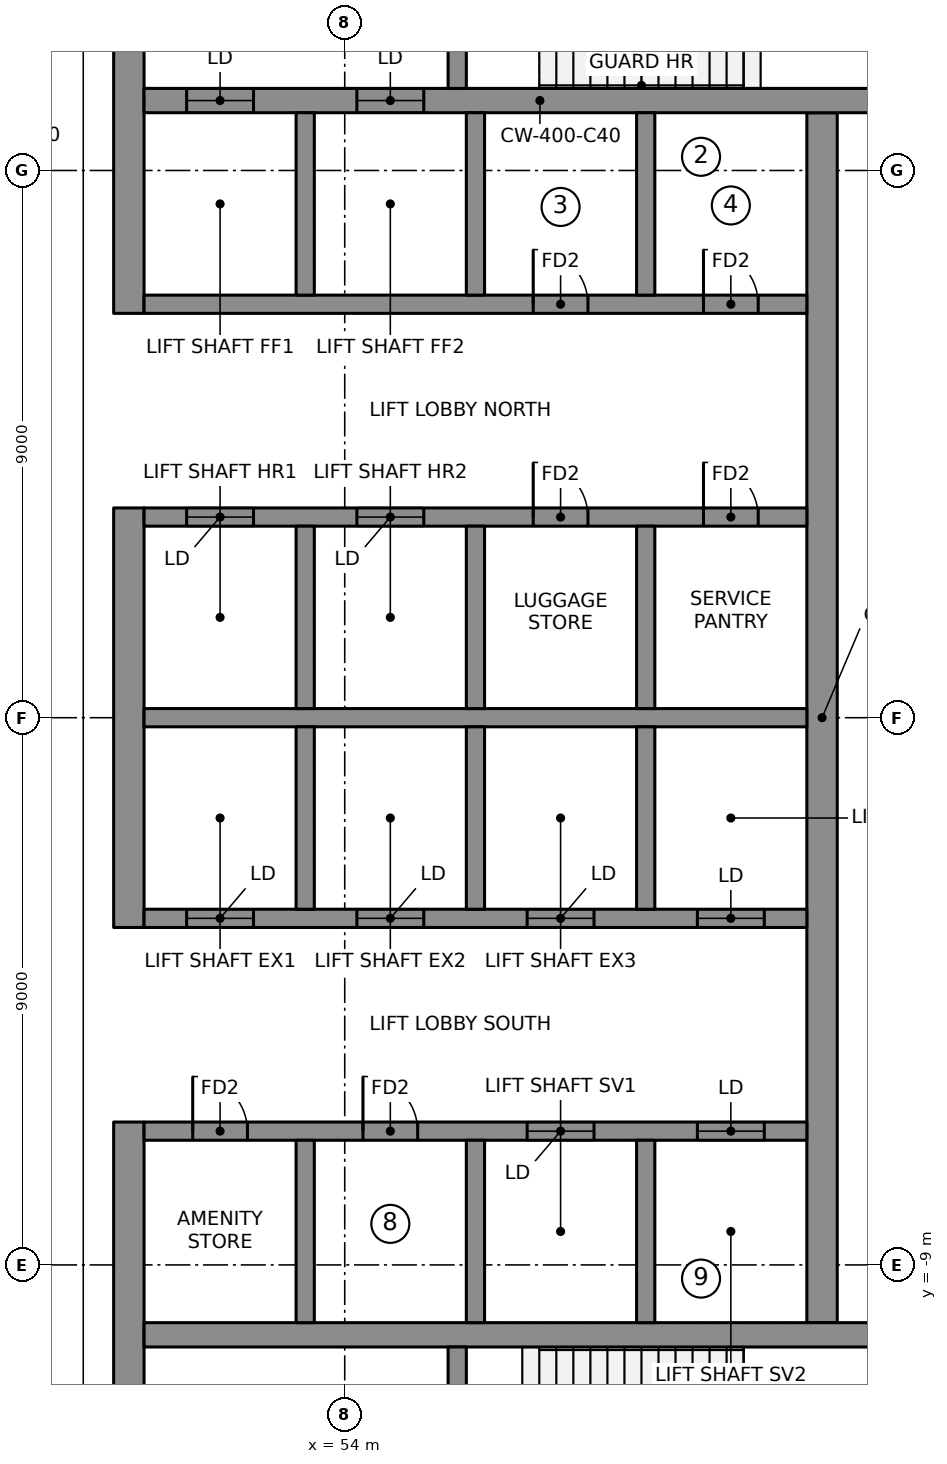
"""IFC4 building model, lengths in metres.
Left out: names, types, materials, properties, quantities, classifications, styles, units other than length and angle.
Written with IfcOpenShell. Run it as: python <this file> out.ifc"""

import sys

from ifc_helpers import new_model, si_unit, direction, frame, frame_2d, origin, place, context, subcontext, project, spatial, rectangle, extrude, element, fill, save


model = new_model("IFC4")
c1 = context("Model", 3, precision=1e-05, world=origin(), true_north=direction((0.0, 1.0)))
c2 = subcontext(c1, "Body", "Model", "MODEL_VIEW")
j1 = project(units=[si_unit("LENGTHUNIT", "METRE"), si_unit("PLANEANGLEUNIT", "RADIAN")], contexts=[c1])
p1 = place(None, origin())
s1 = spatial("IfcSite", under=j1, at=p1, CompositionType="ELEMENT")
p2 = place(p1, origin())
s2 = spatial("IfcBuilding", under=s1, at=p2, CompositionType="ELEMENT")
p3 = place(p2, frame((0.0, 0.0, 308.6)))
s3 = spatial("IfcBuildingStorey", under=s2, at=p3, CompositionType="ELEMENT", Elevation=308.6)
p4 = place(p3, frame((50.45, 6.65, 0.0), z_axis=(0.0, 0.0, 1.0), x_axis=(0.0, 1.0, 0.0)))
e1 = element("IfcWall", 1, at=p4, inside=s3, PredefinedType="SHEAR", context=c2, shape_type="SweptSolid", body=[
    extrude(rectangle(XDim=9.6, YDim=0.5, at=frame_2d((4.8, 0.0))), origin(), (0.0, 0.0, 1.0), 4.6),
])
p5 = place(p4, frame((6.5, 0.0, 0.0)))
e2 = element("IfcOpeningElement", 2, at=p5, cuts=e1, PredefinedType="OPENING", context=c2, shape_type="SweptSolid", body=[
    extrude(rectangle(XDim=1.1, YDim=2.1, at=frame_2d((0.55, 1.05))), frame((0.0, 0.26, 0.0), z_axis=(0.0, -1.0, 0.0), x_axis=(1.0, 0.0, 0.0)), (0.0, 0.0, 1.0), 0.52),
])
p6 = place(p3, frame((50.45, -3.45, 0.0), z_axis=(0.0, 0.0, 1.0), x_axis=(0.0, 1.0, 0.0)))
e3 = element("IfcWall", 3, at=p6, inside=s3, PredefinedType="SHEAR", context=c2, shape_type="SweptSolid", body=[
    extrude(rectangle(XDim=6.9, YDim=0.5, at=frame_2d((3.45, 0.0))), origin(), (0.0, 0.0, 1.0), 4.6),
])
p7 = place(p3, frame((50.45, -16.25, 0.0), z_axis=(0.0, 0.0, 1.0), x_axis=(0.0, 1.0, 0.0)))
e4 = element("IfcWall", 4, at=p7, inside=s3, PredefinedType="SHEAR", context=c2, shape_type="SweptSolid", body=[
    extrude(rectangle(XDim=9.6, YDim=0.5, at=frame_2d((4.8, 0.0))), origin(), (0.0, 0.0, 1.0), 4.6),
])
p8 = place(p7, frame((2.0, 0.0, 0.0)))
e5 = element("IfcOpeningElement", 5, at=p8, cuts=e4, PredefinedType="OPENING", context=c2, shape_type="SweptSolid", body=[
    extrude(rectangle(XDim=1.1, YDim=2.1, at=frame_2d((0.55, 1.05))), frame((0.0, 0.26, 0.0), z_axis=(0.0, -1.0, 0.0), x_axis=(1.0, 0.0, 0.0)), (0.0, 0.0, 1.0), 0.52),
])
p9 = place(p3, frame((61.85, -9.95, 0.0), z_axis=(0.0, 0.0, 1.0), x_axis=(0.0, 1.0, 0.0)))
e6 = element("IfcWall", 6, at=p9, inside=s3, PredefinedType="SHEAR", context=c2, shape_type="SweptSolid", body=[
    extrude(rectangle(XDim=19.9, YDim=0.5, at=frame_2d((9.95, 0.0))), origin(), (0.0, 0.0, 1.0), 4.6),
])
p10 = place(p3, frame((50.7, 10.15, 0.0), z_axis=(0.0, 0.0, 1.0), x_axis=(1.0, 0.0, 0.0)))
e7 = element("IfcWall", 7, at=p10, inside=s3, PredefinedType="SHEAR", context=c2, shape_type="SweptSolid", body=[
    extrude(rectangle(XDim=13.02, YDim=0.4, at=frame_2d((6.51, 0.0))), origin(), (0.0, 0.0, 1.0), 4.6),
])
p11 = place(p10, frame((0.7, 0.0, 0.0)))
e8 = element("IfcOpeningElement", 8, at=p11, cuts=e7, PredefinedType="OPENING", context=c2, shape_type="SweptSolid", body=[
    extrude(rectangle(XDim=1.1, YDim=2.1, at=frame_2d((0.55, 1.05))), frame((0.0, 0.21, 0.0), z_axis=(0.0, -1.0, 0.0), x_axis=(1.0, 0.0, 0.0)), (0.0, 0.0, 1.0), 0.42),
])
p12 = place(p10, frame((3.5, 0.0, 0.0)))
e9 = element("IfcOpeningElement", 9, at=p12, cuts=e7, PredefinedType="OPENING", context=c2, shape_type="SweptSolid", body=[
    extrude(rectangle(XDim=1.1, YDim=2.1, at=frame_2d((0.55, 1.05))), frame((0.0, 0.21, 0.0), z_axis=(0.0, -1.0, 0.0), x_axis=(1.0, 0.0, 0.0)), (0.0, 0.0, 1.0), 0.42),
])
p13 = place(p3, frame((50.7, -10.15, 0.0), z_axis=(0.0, 0.0, 1.0), x_axis=(1.0, 0.0, 0.0)))
e10 = element("IfcWall", 10, at=p13, inside=s3, PredefinedType="SHEAR", context=c2, shape_type="SweptSolid", body=[
    extrude(rectangle(XDim=13.02, YDim=0.4, at=frame_2d((6.51, 0.0))), origin(), (0.0, 0.0, 1.0), 4.6),
])
p14 = place(p3, frame((50.7, 0.0, 0.0), z_axis=(0.0, 0.0, 1.0), x_axis=(1.0, 0.0, 0.0)))
e11 = element("IfcWall", 11, at=p14, inside=s3, PredefinedType="SHEAR", context=c2, shape_type="SweptSolid", body=[
    extrude(rectangle(XDim=10.9, YDim=0.3, at=frame_2d((5.45, 0.0))), origin(), (0.0, 0.0, 1.0), 4.6),
])
p15 = place(p3, frame((50.7, 3.3, 0.0), z_axis=(0.0, 0.0, 1.0), x_axis=(1.0, 0.0, 0.0)))
e12 = element("IfcWall", 12, at=p15, inside=s3, PredefinedType="SHEAR", context=c2, shape_type="SweptSolid", body=[
    extrude(rectangle(XDim=10.9, YDim=0.3, at=frame_2d((5.45, 0.0))), origin(), (0.0, 0.0, 1.0), 4.6),
])
p16 = place(p15, frame((0.7, 0.0, 0.0)))
e13 = element("IfcOpeningElement", 13, at=p16, cuts=e12, PredefinedType="OPENING", context=c2, shape_type="SweptSolid", body=[
    extrude(rectangle(XDim=1.1, YDim=2.1, at=frame_2d((0.55, 1.05))), frame((0.0, 0.16, 0.0), z_axis=(0.0, -1.0, 0.0), x_axis=(1.0, 0.0, 0.0)), (0.0, 0.0, 1.0), 0.32),
])
p17 = place(p15, frame((3.5, 0.0, 0.0)))
e14 = element("IfcOpeningElement", 14, at=p17, cuts=e12, PredefinedType="OPENING", context=c2, shape_type="SweptSolid", body=[
    extrude(rectangle(XDim=1.1, YDim=2.1, at=frame_2d((0.55, 1.05))), frame((0.0, 0.16, 0.0), z_axis=(0.0, -1.0, 0.0), x_axis=(1.0, 0.0, 0.0)), (0.0, 0.0, 1.0), 0.32),
])
p18 = place(p15, frame((6.4, 0.0, 0.0)))
e15 = element("IfcOpeningElement", 15, at=p18, cuts=e12, PredefinedType="OPENING", context=c2, shape_type="SweptSolid", body=[
    extrude(rectangle(XDim=0.9, YDim=2.1, at=frame_2d((0.45, 1.05))), frame((0.0, 0.16, 0.0), z_axis=(0.0, -1.0, 0.0), x_axis=(1.0, 0.0, 0.0)), (0.0, 0.0, 1.0), 0.32),
])
p19 = place(p15, frame((9.2, 0.0, 0.0)))
e16 = element("IfcOpeningElement", 16, at=p19, cuts=e12, PredefinedType="OPENING", context=c2, shape_type="SweptSolid", body=[
    extrude(rectangle(XDim=0.9, YDim=2.1, at=frame_2d((0.45, 1.05))), frame((0.0, 0.16, 0.0), z_axis=(0.0, -1.0, 0.0), x_axis=(1.0, 0.0, 0.0)), (0.0, 0.0, 1.0), 0.32),
])
p20 = place(p3, frame((50.7, 6.8, 0.0), z_axis=(0.0, 0.0, 1.0), x_axis=(1.0, 0.0, 0.0)))
e17 = element("IfcWall", 17, at=p20, inside=s3, PredefinedType="SHEAR", context=c2, shape_type="SweptSolid", body=[
    extrude(rectangle(XDim=10.9, YDim=0.3, at=frame_2d((5.45, 0.0))), origin(), (0.0, 0.0, 1.0), 4.6),
])
p21 = place(p20, frame((6.4, 0.0, 0.0)))
e18 = element("IfcOpeningElement", 18, at=p21, cuts=e17, PredefinedType="OPENING", context=c2, shape_type="SweptSolid", body=[
    extrude(rectangle(XDim=0.9, YDim=2.1, at=frame_2d((0.45, 1.05))), frame((0.0, 0.16, 0.0), z_axis=(0.0, -1.0, 0.0), x_axis=(1.0, 0.0, 0.0)), (0.0, 0.0, 1.0), 0.32),
])
p22 = place(p20, frame((9.2, 0.0, 0.0)))
e19 = element("IfcOpeningElement", 19, at=p22, cuts=e17, PredefinedType="OPENING", context=c2, shape_type="SweptSolid", body=[
    extrude(rectangle(XDim=0.9, YDim=2.1, at=frame_2d((0.45, 1.05))), frame((0.0, 0.16, 0.0), z_axis=(0.0, -1.0, 0.0), x_axis=(1.0, 0.0, 0.0)), (0.0, 0.0, 1.0), 0.32),
])
for number, where, z_axis, x_axis in (
    (20, (53.35, 0.15, 0.0), (0.0, 0.0, 1.0), (0.0, 1.0, 0.0)),
    (21, (53.35, 6.95, 0.0), (0.0, 0.0, 1.0), (0.0, 1.0, 0.0)),
    (22, (56.15, 0.15, 0.0), (0.0, 0.0, 1.0), (0.0, 1.0, 0.0)),
    (23, (56.15, 6.95, 0.0), (0.0, 0.0, 1.0), (0.0, 1.0, 0.0)),
    (24, (58.95, 0.15, 0.0), (0.0, 0.0, 1.0), (0.0, 1.0, 0.0)),
    (25, (58.95, 6.95, 0.0), (0.0, 0.0, 1.0), (0.0, 1.0, 0.0)),
):
    element("IfcWall", number, at=place(p3, frame(where, z_axis=z_axis, x_axis=x_axis)), inside=s3, PredefinedType="SHEAR", context=c2, shape_type="SweptSolid", body=[
        extrude(rectangle(XDim=3.0, YDim=0.3, at=frame_2d((1.5, 0.0))), origin(), (0.0, 0.0, 1.0), 4.6),
    ])
p23 = place(p3, frame((50.7, -3.3, 0.0), z_axis=(0.0, 0.0, 1.0), x_axis=(1.0, 0.0, 0.0)))
e26 = element("IfcWall", 26, at=p23, inside=s3, PredefinedType="SHEAR", context=c2, shape_type="SweptSolid", body=[
    extrude(rectangle(XDim=10.9, YDim=0.3, at=frame_2d((5.45, 0.0))), origin(), (0.0, 0.0, 1.0), 4.6),
])
p24 = place(p23, frame((0.7, 0.0, 0.0)))
e27 = element("IfcOpeningElement", 27, at=p24, cuts=e26, PredefinedType="OPENING", context=c2, shape_type="SweptSolid", body=[
    extrude(rectangle(XDim=1.1, YDim=2.1, at=frame_2d((0.55, 1.05))), frame((0.0, 0.16, 0.0), z_axis=(0.0, -1.0, 0.0), x_axis=(1.0, 0.0, 0.0)), (0.0, 0.0, 1.0), 0.32),
])
p25 = place(p23, frame((3.5, 0.0, 0.0)))
e28 = element("IfcOpeningElement", 28, at=p25, cuts=e26, PredefinedType="OPENING", context=c2, shape_type="SweptSolid", body=[
    extrude(rectangle(XDim=1.1, YDim=2.1, at=frame_2d((0.55, 1.05))), frame((0.0, 0.16, 0.0), z_axis=(0.0, -1.0, 0.0), x_axis=(1.0, 0.0, 0.0)), (0.0, 0.0, 1.0), 0.32),
])
p26 = place(p23, frame((6.3, 0.0, 0.0)))
e29 = element("IfcOpeningElement", 29, at=p26, cuts=e26, PredefinedType="OPENING", context=c2, shape_type="SweptSolid", body=[
    extrude(rectangle(XDim=1.1, YDim=2.1, at=frame_2d((0.55, 1.05))), frame((0.0, 0.16, 0.0), z_axis=(0.0, -1.0, 0.0), x_axis=(1.0, 0.0, 0.0)), (0.0, 0.0, 1.0), 0.32),
])
p27 = place(p23, frame((9.1, 0.0, 0.0)))
e30 = element("IfcOpeningElement", 30, at=p27, cuts=e26, PredefinedType="OPENING", context=c2, shape_type="SweptSolid", body=[
    extrude(rectangle(XDim=1.1, YDim=2.1, at=frame_2d((0.55, 1.05))), frame((0.0, 0.16, 0.0), z_axis=(0.0, -1.0, 0.0), x_axis=(1.0, 0.0, 0.0)), (0.0, 0.0, 1.0), 0.32),
])
p28 = place(p3, frame((50.7, -6.8, 0.0), z_axis=(0.0, 0.0, 1.0), x_axis=(1.0, 0.0, 0.0)))
e31 = element("IfcWall", 31, at=p28, inside=s3, PredefinedType="SHEAR", context=c2, shape_type="SweptSolid", body=[
    extrude(rectangle(XDim=10.9, YDim=0.3, at=frame_2d((5.45, 0.0))), origin(), (0.0, 0.0, 1.0), 4.6),
])
p29 = place(p28, frame((6.3, 0.0, 0.0)))
e32 = element("IfcOpeningElement", 32, at=p29, cuts=e31, PredefinedType="OPENING", context=c2, shape_type="SweptSolid", body=[
    extrude(rectangle(XDim=1.1, YDim=2.1, at=frame_2d((0.55, 1.05))), frame((0.0, 0.16, 0.0), z_axis=(0.0, -1.0, 0.0), x_axis=(1.0, 0.0, 0.0)), (0.0, 0.0, 1.0), 0.32),
])
p30 = place(p28, frame((9.1, 0.0, 0.0)))
e33 = element("IfcOpeningElement", 33, at=p30, cuts=e31, PredefinedType="OPENING", context=c2, shape_type="SweptSolid", body=[
    extrude(rectangle(XDim=1.1, YDim=2.1, at=frame_2d((0.55, 1.05))), frame((0.0, 0.16, 0.0), z_axis=(0.0, -1.0, 0.0), x_axis=(1.0, 0.0, 0.0)), (0.0, 0.0, 1.0), 0.32),
])
p31 = place(p28, frame((0.8, 0.0, 0.0)))
e34 = element("IfcOpeningElement", 34, at=p31, cuts=e31, PredefinedType="OPENING", context=c2, shape_type="SweptSolid", body=[
    extrude(rectangle(XDim=0.9, YDim=2.1, at=frame_2d((0.45, 1.05))), frame((0.0, 0.16, 0.0), z_axis=(0.0, -1.0, 0.0), x_axis=(1.0, 0.0, 0.0)), (0.0, 0.0, 1.0), 0.32),
])
p32 = place(p28, frame((3.6, 0.0, 0.0)))
e35 = element("IfcOpeningElement", 35, at=p32, cuts=e31, PredefinedType="OPENING", context=c2, shape_type="SweptSolid", body=[
    extrude(rectangle(XDim=0.9, YDim=2.1, at=frame_2d((0.45, 1.05))), frame((0.0, 0.16, 0.0), z_axis=(0.0, -1.0, 0.0), x_axis=(1.0, 0.0, 0.0)), (0.0, 0.0, 1.0), 0.32),
])
for number, where, z_axis, x_axis in (
    (36, (53.35, -3.15, 0.0), (0.0, 0.0, 1.0), (0.0, 1.0, 0.0)),
    (37, (53.35, -9.95, 0.0), (0.0, 0.0, 1.0), (0.0, 1.0, 0.0)),
    (38, (56.15, -3.15, 0.0), (0.0, 0.0, 1.0), (0.0, 1.0, 0.0)),
    (39, (56.15, -9.95, 0.0), (0.0, 0.0, 1.0), (0.0, 1.0, 0.0)),
    (40, (58.95, -3.15, 0.0), (0.0, 0.0, 1.0), (0.0, 1.0, 0.0)),
    (41, (58.95, -9.95, 0.0), (0.0, 0.0, 1.0), (0.0, 1.0, 0.0)),
):
    element("IfcWall", number, at=place(p3, frame(where, z_axis=z_axis, x_axis=x_axis)), inside=s3, PredefinedType="SHEAR", context=c2, shape_type="SweptSolid", body=[
        extrude(rectangle(XDim=3.0, YDim=0.3, at=frame_2d((1.5, 0.0))), origin(), (0.0, 0.0, 1.0), 4.6),
    ])
p33 = place(p3, frame((55.85, 10.35, 0.0), z_axis=(0.0, 0.0, 1.0), x_axis=(0.0, 1.0, 0.0)))
e42 = element("IfcWall", 42, at=p33, inside=s3, PredefinedType="SHEAR", context=c2, shape_type="SweptSolid", body=[
    extrude(rectangle(XDim=5.4, YDim=0.3, at=frame_2d((2.7, 0.0))), origin(), (0.0, 0.0, 1.0), 4.6),
])
p34 = place(p33, frame((1.43, 0.0, 0.0)))
e43 = element("IfcOpeningElement", 43, at=p34, cuts=e42, PredefinedType="OPENING", context=c2, shape_type="SweptSolid", body=[
    extrude(rectangle(XDim=1.1, YDim=2.1, at=frame_2d((0.55, 1.05))), frame((0.0, 0.16, 0.0), z_axis=(0.0, -1.0, 0.0), x_axis=(1.0, 0.0, 0.0)), (0.0, 0.0, 1.0), 0.32),
])
p35 = place(p33, frame((3.6, 0.0, 0.0)))
e44 = element("IfcOpeningElement", 44, at=p35, cuts=e42, PredefinedType="OPENING", context=c2, shape_type="SweptSolid", body=[
    extrude(rectangle(XDim=1.1, YDim=2.1, at=frame_2d((0.55, 1.05))), frame((0.0, 0.16, 0.0), z_axis=(0.0, -1.0, 0.0), x_axis=(1.0, 0.0, 0.0)), (0.0, 0.0, 1.0), 0.32),
])
p36 = place(p3, frame((55.85, -15.75, 0.0), z_axis=(0.0, 0.0, 1.0), x_axis=(0.0, 1.0, 0.0)))
e45 = element("IfcWall", 45, at=p36, inside=s3, PredefinedType="SHEAR", context=c2, shape_type="SweptSolid", body=[
    extrude(rectangle(XDim=5.4, YDim=0.3, at=frame_2d((2.7, 0.0))), origin(), (0.0, 0.0, 1.0), 4.6),
])
p37 = place(p36, frame((3.6, 0.0, 0.0)))
e46 = element("IfcOpeningElement", 46, at=p37, cuts=e45, PredefinedType="OPENING", context=c2, shape_type="SweptSolid", body=[
    extrude(rectangle(XDim=1.1, YDim=2.1, at=frame_2d((0.55, 1.05))), frame((0.0, 0.16, 0.0), z_axis=(0.0, -1.0, 0.0), x_axis=(1.0, 0.0, 0.0)), (0.0, 0.0, 1.0), 0.32),
])
p38 = place(p36, frame((0.8, 0.0, 0.0)))
e47 = element("IfcOpeningElement", 47, at=p38, cuts=e45, PredefinedType="OPENING", context=c2, shape_type="SweptSolid", body=[
    extrude(rectangle(XDim=0.9, YDim=2.1, at=frame_2d((0.45, 1.05))), frame((0.0, 0.16, 0.0), z_axis=(0.0, -1.0, 0.0), x_axis=(1.0, 0.0, 0.0)), (0.0, 0.0, 1.0), 0.32),
])
p39 = place(p11, origin())
e48 = element("IfcDoor", 48, at=p39, inside=s3, OperationType="DOUBLE_DOOR_SLIDING", PredefinedType="DOOR", context=c2, shape_type="SweptSolid", body=[
    extrude(rectangle(XDim=1.1, YDim=2.1, at=frame_2d((0.55, 1.05))), frame((0.0, 0.025, 0.0), z_axis=(0.0, -1.0, 0.0), x_axis=(1.0, 0.0, 0.0)), (0.0, 0.0, 1.0), 0.05),
])
fill(e8, e48)
p40 = place(p12, origin())
e49 = element("IfcDoor", 49, at=p40, inside=s3, OperationType="DOUBLE_DOOR_SLIDING", PredefinedType="DOOR", context=c2, shape_type="SweptSolid", body=[
    extrude(rectangle(XDim=1.1, YDim=2.1, at=frame_2d((0.55, 1.05))), frame((0.0, 0.025, 0.0), z_axis=(0.0, -1.0, 0.0), x_axis=(1.0, 0.0, 0.0)), (0.0, 0.0, 1.0), 0.05),
])
fill(e9, e49)
p41 = place(p16, origin())
e50 = element("IfcDoor", 50, at=p41, inside=s3, OperationType="DOUBLE_DOOR_SLIDING", PredefinedType="DOOR", context=c2, shape_type="SweptSolid", body=[
    extrude(rectangle(XDim=1.1, YDim=2.1, at=frame_2d((0.55, 1.05))), frame((0.0, 0.025, 0.0), z_axis=(0.0, -1.0, 0.0), x_axis=(1.0, 0.0, 0.0)), (0.0, 0.0, 1.0), 0.05),
])
fill(e13, e50)
p42 = place(p17, origin())
e51 = element("IfcDoor", 51, at=p42, inside=s3, OperationType="DOUBLE_DOOR_SLIDING", PredefinedType="DOOR", context=c2, shape_type="SweptSolid", body=[
    extrude(rectangle(XDim=1.1, YDim=2.1, at=frame_2d((0.55, 1.05))), frame((0.0, 0.025, 0.0), z_axis=(0.0, -1.0, 0.0), x_axis=(1.0, 0.0, 0.0)), (0.0, 0.0, 1.0), 0.05),
])
fill(e14, e51)
p43 = place(p24, origin())
e52 = element("IfcDoor", 52, at=p43, inside=s3, OperationType="DOUBLE_DOOR_SLIDING", PredefinedType="DOOR", context=c2, shape_type="SweptSolid", body=[
    extrude(rectangle(XDim=1.1, YDim=2.1, at=frame_2d((0.55, 1.05))), frame((0.0, 0.025, 0.0), z_axis=(0.0, -1.0, 0.0), x_axis=(1.0, 0.0, 0.0)), (0.0, 0.0, 1.0), 0.05),
])
fill(e27, e52)
p44 = place(p25, origin())
e53 = element("IfcDoor", 53, at=p44, inside=s3, OperationType="DOUBLE_DOOR_SLIDING", PredefinedType="DOOR", context=c2, shape_type="SweptSolid", body=[
    extrude(rectangle(XDim=1.1, YDim=2.1, at=frame_2d((0.55, 1.05))), frame((0.0, 0.025, 0.0), z_axis=(0.0, -1.0, 0.0), x_axis=(1.0, 0.0, 0.0)), (0.0, 0.0, 1.0), 0.05),
])
fill(e28, e53)
p45 = place(p26, origin())
e54 = element("IfcDoor", 54, at=p45, inside=s3, OperationType="DOUBLE_DOOR_SLIDING", PredefinedType="DOOR", context=c2, shape_type="SweptSolid", body=[
    extrude(rectangle(XDim=1.1, YDim=2.1, at=frame_2d((0.55, 1.05))), frame((0.0, 0.025, 0.0), z_axis=(0.0, -1.0, 0.0), x_axis=(1.0, 0.0, 0.0)), (0.0, 0.0, 1.0), 0.05),
])
fill(e29, e54)
p46 = place(p27, origin())
e55 = element("IfcDoor", 55, at=p46, inside=s3, OperationType="DOUBLE_DOOR_SLIDING", PredefinedType="DOOR", context=c2, shape_type="SweptSolid", body=[
    extrude(rectangle(XDim=1.1, YDim=2.1, at=frame_2d((0.55, 1.05))), frame((0.0, 0.025, 0.0), z_axis=(0.0, -1.0, 0.0), x_axis=(1.0, 0.0, 0.0)), (0.0, 0.0, 1.0), 0.05),
])
fill(e30, e55)
p47 = place(p29, origin())
e56 = element("IfcDoor", 56, at=p47, inside=s3, OperationType="DOUBLE_DOOR_SLIDING", PredefinedType="DOOR", context=c2, shape_type="SweptSolid", body=[
    extrude(rectangle(XDim=1.1, YDim=2.1, at=frame_2d((0.55, 1.05))), frame((0.0, 0.025, 0.0), z_axis=(0.0, -1.0, 0.0), x_axis=(1.0, 0.0, 0.0)), (0.0, 0.0, 1.0), 0.05),
])
fill(e32, e56)
p48 = place(p30, origin())
e57 = element("IfcDoor", 57, at=p48, inside=s3, OperationType="DOUBLE_DOOR_SLIDING", PredefinedType="DOOR", context=c2, shape_type="SweptSolid", body=[
    extrude(rectangle(XDim=1.1, YDim=2.1, at=frame_2d((0.55, 1.05))), frame((0.0, 0.025, 0.0), z_axis=(0.0, -1.0, 0.0), x_axis=(1.0, 0.0, 0.0)), (0.0, 0.0, 1.0), 0.05),
])
fill(e33, e57)
p49 = place(p21, origin())
e58 = element("IfcDoor", 58, at=p49, inside=s3, OperationType="SINGLE_SWING_LEFT", PredefinedType="DOOR", context=c2, shape_type="SweptSolid", body=[
    extrude(rectangle(XDim=0.9, YDim=2.1, at=frame_2d((0.45, 1.05))), frame((0.0, 0.025, 0.0), z_axis=(0.0, -1.0, 0.0), x_axis=(1.0, 0.0, 0.0)), (0.0, 0.0, 1.0), 0.05),
])
fill(e18, e58)
p50 = place(p22, origin())
e59 = element("IfcDoor", 59, at=p50, inside=s3, OperationType="SINGLE_SWING_LEFT", PredefinedType="DOOR", context=c2, shape_type="SweptSolid", body=[
    extrude(rectangle(XDim=0.9, YDim=2.1, at=frame_2d((0.45, 1.05))), frame((0.0, 0.025, 0.0), z_axis=(0.0, -1.0, 0.0), x_axis=(1.0, 0.0, 0.0)), (0.0, 0.0, 1.0), 0.05),
])
fill(e19, e59)
p51 = place(p18, origin())
e60 = element("IfcDoor", 60, at=p51, inside=s3, OperationType="SINGLE_SWING_LEFT", PredefinedType="DOOR", context=c2, shape_type="SweptSolid", body=[
    extrude(rectangle(XDim=0.9, YDim=2.1, at=frame_2d((0.45, 1.05))), frame((0.0, 0.025, 0.0), z_axis=(0.0, -1.0, 0.0), x_axis=(1.0, 0.0, 0.0)), (0.0, 0.0, 1.0), 0.05),
])
fill(e15, e60)
p52 = place(p19, origin())
e61 = element("IfcDoor", 61, at=p52, inside=s3, OperationType="SINGLE_SWING_LEFT", PredefinedType="DOOR", context=c2, shape_type="SweptSolid", body=[
    extrude(rectangle(XDim=0.9, YDim=2.1, at=frame_2d((0.45, 1.05))), frame((0.0, 0.025, 0.0), z_axis=(0.0, -1.0, 0.0), x_axis=(1.0, 0.0, 0.0)), (0.0, 0.0, 1.0), 0.05),
])
fill(e16, e61)
p53 = place(p31, origin())
e62 = element("IfcDoor", 62, at=p53, inside=s3, OperationType="SINGLE_SWING_LEFT", PredefinedType="DOOR", context=c2, shape_type="SweptSolid", body=[
    extrude(rectangle(XDim=0.9, YDim=2.1, at=frame_2d((0.45, 1.05))), frame((0.0, 0.025, 0.0), z_axis=(0.0, -1.0, 0.0), x_axis=(1.0, 0.0, 0.0)), (0.0, 0.0, 1.0), 0.05),
])
fill(e34, e62)
p54 = place(p32, origin())
e63 = element("IfcDoor", 63, at=p54, inside=s3, OperationType="SINGLE_SWING_LEFT", PredefinedType="DOOR", context=c2, shape_type="SweptSolid", body=[
    extrude(rectangle(XDim=0.9, YDim=2.1, at=frame_2d((0.45, 1.05))), frame((0.0, 0.025, 0.0), z_axis=(0.0, -1.0, 0.0), x_axis=(1.0, 0.0, 0.0)), (0.0, 0.0, 1.0), 0.05),
])
fill(e35, e63)
save(model, sys.argv[1])
